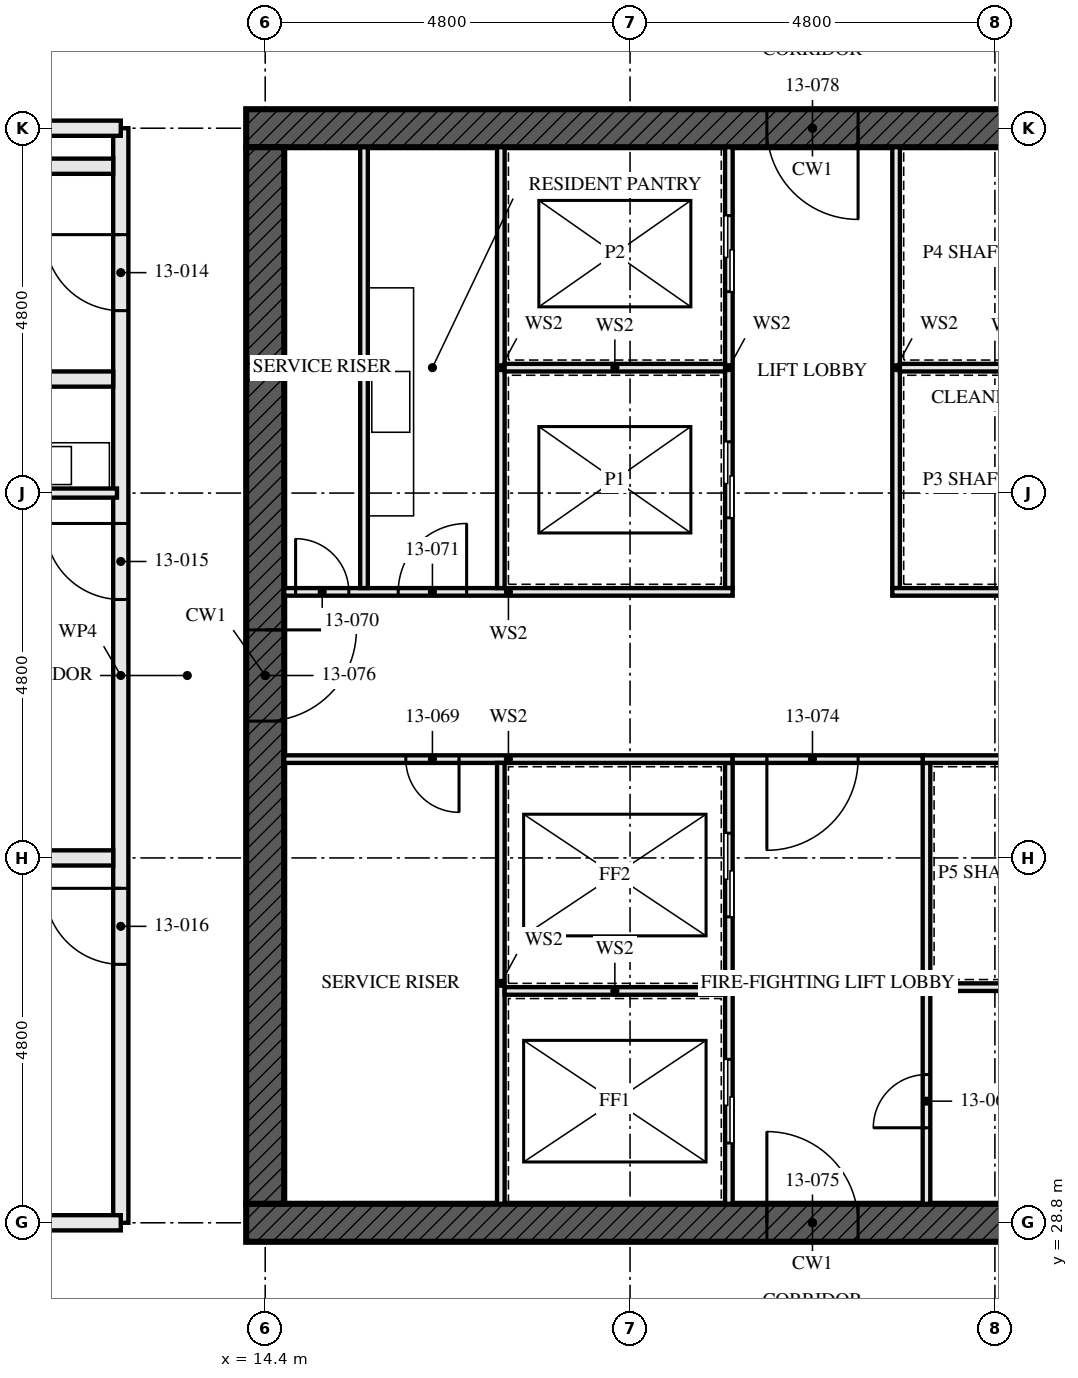
"""IFC4 building model, lengths in metres.
Left out: names, types, materials, properties, quantities, classifications, styles, units other than length and angle.
Written with IfcOpenShell. Run it as: python <this file> out.ifc"""

import sys

from ifc_helpers import new_model, si_unit, direction, frame, frame_2d, origin, place, context, subcontext, project, spatial, rectangle, extrude, element, fill, save


model = new_model("IFC4")
c1 = context("Model", 3, precision=1e-05, world=origin(), true_north=direction((0.0, 1.0)))
c2 = subcontext(c1, "Body", "Model", "MODEL_VIEW")
j1 = project(units=[si_unit("LENGTHUNIT", "METRE"), si_unit("PLANEANGLEUNIT", "RADIAN")], contexts=[c1])
p1 = place(None, origin())
s1 = spatial("IfcSite", under=j1, at=p1, CompositionType="ELEMENT")
p2 = place(p1, origin())
s2 = spatial("IfcBuilding", under=s1, at=p2, CompositionType="ELEMENT")
p3 = place(p2, frame((0.0, 0.0, 51.5)))
s3 = spatial("IfcBuildingStorey", under=s2, at=p3, CompositionType="ELEMENT", Elevation=51.5)
p4 = place(p3, frame((14.15, 28.8, -0.17), z_axis=(0.0, 0.0, 1.0), x_axis=(1.0, 0.0, 0.0)))
e1 = element("IfcWall", 1, at=p4, inside=s3, PredefinedType="SHEAR", context=c2, shape_type="SweptSolid", body=[
    extrude(rectangle(XDim=14.9, YDim=0.5, at=frame_2d((7.45, 0.0))), origin(), (0.0, 0.0, 1.0), 3.5),
])
p5 = place(p4, frame((6.85, 0.0, 0.17)))
e2 = element("IfcOpeningElement", 2, at=p5, cuts=e1, PredefinedType="OPENING", context=c2, shape_type="SweptSolid", body=[
    extrude(rectangle(XDim=1.2, YDim=2.1, at=frame_2d((0.6, 1.05))), frame((0.0, 0.26, 0.0), z_axis=(0.0, -1.0, 0.0), x_axis=(1.0, 0.0, 0.0)), (0.0, 0.0, 1.0), 0.521),
])
p6 = place(p3, frame((29.05, 43.2, -0.17), z_axis=(0.0, 0.0, 1.0), x_axis=(-1.0, 0.0, 0.0)))
e3 = element("IfcWall", 3, at=p6, inside=s3, PredefinedType="SHEAR", context=c2, shape_type="SweptSolid", body=[
    extrude(rectangle(XDim=14.9, YDim=0.5, at=frame_2d((7.45, 0.0))), origin(), (0.0, 0.0, 1.0), 3.5),
])
p7 = place(p6, frame((6.85, 0.0, 0.17)))
e4 = element("IfcOpeningElement", 4, at=p7, cuts=e3, PredefinedType="OPENING", context=c2, shape_type="SweptSolid", body=[
    extrude(rectangle(XDim=1.2, YDim=2.1, at=frame_2d((0.6, 1.05))), frame((0.0, 0.26, 0.0), z_axis=(0.0, -1.0, 0.0), x_axis=(1.0, 0.0, 0.0)), (0.0, 0.0, 1.0), 0.521),
])
p8 = place(p3, frame((14.4, 42.95, -0.17), z_axis=(0.0, 0.0, 1.0), x_axis=(0.0, -1.0, 0.0)))
e5 = element("IfcWall", 5, at=p8, inside=s3, PredefinedType="SHEAR", context=c2, shape_type="SweptSolid", body=[
    extrude(rectangle(XDim=13.9, YDim=0.5, at=frame_2d((6.95, 0.0))), origin(), (0.0, 0.0, 1.0), 3.5),
])
p9 = place(p8, frame((6.35, 0.0, 0.17)))
e6 = element("IfcOpeningElement", 6, at=p9, cuts=e5, PredefinedType="OPENING", context=c2, shape_type="SweptSolid", body=[
    extrude(rectangle(XDim=1.2, YDim=2.1, at=frame_2d((0.6, 1.05))), frame((0.0, 0.26, 0.0), z_axis=(0.0, -1.0, 0.0), x_axis=(1.0, 0.0, 0.0)), (0.0, 0.0, 1.0), 0.521),
])
for number, where, z_axis, x_axis in (
    (7, (7.7, 42.7, 0.0), (0.0, 0.0, 1.0), (1.0, 0.0, 0.0)),
    (8, (7.7, 39.9, 0.0), (0.0, 0.0, 1.0), (1.0, 0.0, 0.0)),
):
    element("IfcWall", number, at=place(p3, frame(where, z_axis=z_axis, x_axis=x_axis)), inside=s3, PredefinedType="SOLIDWALL", context=c2, shape_type="SweptSolid", body=[
        extrude(rectangle(XDim=4.7, YDim=0.2, at=frame_2d((2.35, 0.0))), origin(), (0.0, 0.0, 1.0), 2.99),
    ])
p10 = place(p3, frame((6.2, 38.4, 0.0), z_axis=(0.0, 0.0, 1.0), x_axis=(1.0, 0.0, 0.0)))
e9 = element("IfcWall", 9, at=p10, inside=s3, PredefinedType="PARTITIONING", context=c2, shape_type="SweptSolid", body=[
    extrude(rectangle(XDim=6.25, YDim=0.12, at=frame_2d((3.125, 0.0))), origin(), (0.0, 0.0, 1.0), 2.55),
])
p11 = place(p10, frame((3.15, 0.0, 0.0)))
e10 = element("IfcOpeningElement", 10, at=p11, cuts=e9, PredefinedType="OPENING", context=c2, shape_type="SweptSolid", body=[
    extrude(rectangle(XDim=0.9, YDim=2.1, at=frame_2d((0.45, 1.05))), frame((0.0, 0.071, 0.0), z_axis=(0.0, -1.0, 0.0), x_axis=(1.0, 0.0, 0.0)), (0.0, 0.0, 1.0), 0.141),
])
p12 = place(p3, frame((0.395, 33.6, 0.0), z_axis=(0.0, 0.0, 1.0), x_axis=(1.0, 0.0, 0.0)))
e11 = element("IfcWall", 11, at=p12, inside=s3, PredefinedType="PARTITIONING", context=c2, shape_type="SweptSolid", body=[
    extrude(rectangle(XDim=12.005, YDim=0.2, at=frame_2d((6.002, 0.0))), origin(), (0.0, 0.0, 1.0), 2.55),
])
p13 = place(p3, frame((12.5, 43.2, 0.0), z_axis=(0.0, 0.0, 1.0), x_axis=(0.0, -1.0, 0.0)))
e12 = element("IfcWall", 12, at=p13, inside=s3, PredefinedType="PARTITIONING", context=c2, shape_type="SweptSolid", body=[
    extrude(rectangle(XDim=14.4, YDim=0.2, at=frame_2d((7.2, 0.0))), origin(), (0.0, 0.0, 1.0), 2.55),
])
p14 = place(p13, frame((1.4, 0.0, 0.0)))
e13 = element("IfcOpeningElement", 13, at=p14, cuts=e12, PredefinedType="OPENING", context=c2, shape_type="SweptSolid", body=[
    extrude(rectangle(XDim=1.0, YDim=2.1, at=frame_2d((0.5, 1.05))), frame((0.0, 0.111, 0.0), z_axis=(0.0, -1.0, 0.0), x_axis=(1.0, 0.0, 0.0)), (0.0, 0.0, 1.0), 0.221),
])
p15 = place(p13, frame((5.2, 0.0, 0.0)))
e14 = element("IfcOpeningElement", 14, at=p15, cuts=e12, PredefinedType="OPENING", context=c2, shape_type="SweptSolid", body=[
    extrude(rectangle(XDim=1.0, YDim=2.1, at=frame_2d((0.5, 1.05))), frame((0.0, 0.111, 0.0), z_axis=(0.0, -1.0, 0.0), x_axis=(1.0, 0.0, 0.0)), (0.0, 0.0, 1.0), 0.221),
])
p16 = place(p13, frame((10.0, 0.0, 0.0)))
e15 = element("IfcOpeningElement", 15, at=p16, cuts=e12, PredefinedType="OPENING", context=c2, shape_type="SweptSolid", body=[
    extrude(rectangle(XDim=1.0, YDim=2.1, at=frame_2d((0.5, 1.05))), frame((0.0, 0.111, 0.0), z_axis=(0.0, -1.0, 0.0), x_axis=(1.0, 0.0, 0.0)), (0.0, 0.0, 1.0), 0.221),
])
p17 = place(p3, frame((15.7, 37.15, 0.0), z_axis=(0.0, 0.0, 1.0), x_axis=(0.0, 1.0, 0.0)))
e16 = element("IfcWall", 16, at=p17, inside=s3, PredefinedType="SOLIDWALL", context=c2, shape_type="SweptSolid", body=[
    extrude(rectangle(XDim=5.8, YDim=0.1, at=frame_2d((2.9, 0.0))), origin(), (0.0, 0.0, 1.0), 3.33),
])
p18 = place(p3, frame((20.5, 29.05, 0.0), z_axis=(0.0, 0.0, 1.0), x_axis=(0.0, 1.0, 0.0)))
e17 = element("IfcWall", 17, at=p18, inside=s3, PredefinedType="SOLIDWALL", context=c2, shape_type="SweptSolid", body=[
    extrude(rectangle(XDim=5.8, YDim=0.1, at=frame_2d((2.9, 0.0))), origin(), (0.0, 0.0, 1.0), 3.33),
])
p19 = place(p18, frame((0.8, 0.0, 0.0)))
e18 = element("IfcOpeningElement", 18, at=p19, cuts=e17, PredefinedType="OPENING", context=c2, shape_type="SweptSolid", body=[
    extrude(rectangle(XDim=1.1, YDim=2.3, at=frame_2d((0.55, 1.15))), frame((0.0, 0.061, 0.0), z_axis=(0.0, -1.0, 0.0), x_axis=(1.0, 0.0, 0.0)), (0.0, 0.0, 1.0), 0.121),
])
p20 = place(p18, frame((3.775, 0.0, 0.0)))
e19 = element("IfcOpeningElement", 19, at=p20, cuts=e17, PredefinedType="OPENING", context=c2, shape_type="SweptSolid", body=[
    extrude(rectangle(XDim=1.1, YDim=2.3, at=frame_2d((0.55, 1.15))), frame((0.0, 0.061, 0.0), z_axis=(0.0, -1.0, 0.0), x_axis=(1.0, 0.0, 0.0)), (0.0, 0.0, 1.0), 0.121),
])
p21 = place(p3, frame((20.5, 37.15, 0.0), z_axis=(0.0, 0.0, 1.0), x_axis=(0.0, 1.0, 0.0)))
e20 = element("IfcWall", 20, at=p21, inside=s3, PredefinedType="SOLIDWALL", context=c2, shape_type="SweptSolid", body=[
    extrude(rectangle(XDim=5.8, YDim=0.1, at=frame_2d((2.9, 0.0))), origin(), (0.0, 0.0, 1.0), 3.33),
])
p22 = place(p21, frame((0.925, 0.0, 0.0)))
e21 = element("IfcOpeningElement", 21, at=p22, cuts=e20, PredefinedType="OPENING", context=c2, shape_type="SweptSolid", body=[
    extrude(rectangle(XDim=1.0, YDim=2.1, at=frame_2d((0.5, 1.05))), frame((0.0, 0.061, 0.0), z_axis=(0.0, -1.0, 0.0), x_axis=(1.0, 0.0, 0.0)), (0.0, 0.0, 1.0), 0.121),
])
p23 = place(p21, frame((3.9, 0.0, 0.0)))
e22 = element("IfcOpeningElement", 22, at=p23, cuts=e20, PredefinedType="OPENING", context=c2, shape_type="SweptSolid", body=[
    extrude(rectangle(XDim=1.0, YDim=2.1, at=frame_2d((0.5, 1.05))), frame((0.0, 0.061, 0.0), z_axis=(0.0, -1.0, 0.0), x_axis=(1.0, 0.0, 0.0)), (0.0, 0.0, 1.0), 0.121),
])
p24 = place(p3, frame((22.7, 37.15, 0.0), z_axis=(0.0, 0.0, 1.0), x_axis=(0.0, 1.0, 0.0)))
e23 = element("IfcWall", 23, at=p24, inside=s3, PredefinedType="SOLIDWALL", context=c2, shape_type="SweptSolid", body=[
    extrude(rectangle(XDim=5.8, YDim=0.1, at=frame_2d((2.9, 0.0))), origin(), (0.0, 0.0, 1.0), 3.33),
])
p25 = place(p3, frame((23.1, 29.05, 0.0), z_axis=(0.0, 0.0, 1.0), x_axis=(0.0, 1.0, 0.0)))
e24 = element("IfcWall", 24, at=p25, inside=s3, PredefinedType="SOLIDWALL", context=c2, shape_type="SweptSolid", body=[
    extrude(rectangle(XDim=5.8, YDim=0.1, at=frame_2d((2.9, 0.0))), origin(), (0.0, 0.0, 1.0), 3.33),
])
p26 = place(p25, frame((1.0, 0.0, 0.0)))
e25 = element("IfcOpeningElement", 25, at=p26, cuts=e24, PredefinedType="OPENING", context=c2, shape_type="SweptSolid", body=[
    extrude(rectangle(XDim=0.7, YDim=2.1, at=frame_2d((0.35, 1.05))), frame((0.0, 0.061, 0.0), z_axis=(0.0, -1.0, 0.0), x_axis=(1.0, 0.0, 0.0)), (0.0, 0.0, 1.0), 0.121),
])
p27 = place(p3, frame((14.65, 34.9, 0.0), z_axis=(0.0, 0.0, 1.0), x_axis=(1.0, 0.0, 0.0)))
e26 = element("IfcWall", 26, at=p27, inside=s3, PredefinedType="SOLIDWALL", context=c2, shape_type="SweptSolid", body=[
    extrude(rectangle(XDim=5.9, YDim=0.1, at=frame_2d((2.95, 0.0))), origin(), (0.0, 0.0, 1.0), 3.33),
])
p28 = place(p27, frame((1.6, 0.0, 0.0)))
e27 = element("IfcOpeningElement", 27, at=p28, cuts=e26, PredefinedType="OPENING", context=c2, shape_type="SweptSolid", body=[
    extrude(rectangle(XDim=0.7, YDim=2.1, at=frame_2d((0.35, 1.05))), frame((0.0, 0.061, 0.0), z_axis=(0.0, -1.0, 0.0), x_axis=(1.0, 0.0, 0.0)), (0.0, 0.0, 1.0), 0.121),
])
p29 = place(p3, frame((23.05, 34.9, 0.0), z_axis=(0.0, 0.0, 1.0), x_axis=(1.0, 0.0, 0.0)))
e28 = element("IfcWall", 28, at=p29, inside=s3, PredefinedType="SOLIDWALL", context=c2, shape_type="SweptSolid", body=[
    extrude(rectangle(XDim=5.5, YDim=0.1, at=frame_2d((2.75, 0.0))), origin(), (0.0, 0.0, 1.0), 3.33),
])
p30 = place(p3, frame((14.65, 37.1, 0.0), z_axis=(0.0, 0.0, 1.0), x_axis=(1.0, 0.0, 0.0)))
e29 = element("IfcWall", 29, at=p30, inside=s3, PredefinedType="SOLIDWALL", context=c2, shape_type="SweptSolid", body=[
    extrude(rectangle(XDim=5.9, YDim=0.1, at=frame_2d((2.95, 0.0))), origin(), (0.0, 0.0, 1.0), 3.33),
])
p31 = place(p30, frame((0.15, 0.0, 0.0)))
e30 = element("IfcOpeningElement", 30, at=p31, cuts=e29, PredefinedType="OPENING", context=c2, shape_type="SweptSolid", body=[
    extrude(rectangle(XDim=0.7, YDim=2.1, at=frame_2d((0.35, 1.05))), frame((0.0, 0.061, 0.0), z_axis=(0.0, -1.0, 0.0), x_axis=(1.0, 0.0, 0.0)), (0.0, 0.0, 1.0), 0.121),
])
p32 = place(p30, frame((1.5, 0.0, 0.0)))
e31 = element("IfcOpeningElement", 31, at=p32, cuts=e29, PredefinedType="OPENING", context=c2, shape_type="SweptSolid", body=[
    extrude(rectangle(XDim=0.9, YDim=2.1, at=frame_2d((0.45, 1.05))), frame((0.0, 0.061, 0.0), z_axis=(0.0, -1.0, 0.0), x_axis=(1.0, 0.0, 0.0)), (0.0, 0.0, 1.0), 0.121),
])
p33 = place(p3, frame((22.65, 37.1, 0.0), z_axis=(0.0, 0.0, 1.0), x_axis=(1.0, 0.0, 0.0)))
e32 = element("IfcWall", 32, at=p33, inside=s3, PredefinedType="SOLIDWALL", context=c2, shape_type="SweptSolid", body=[
    extrude(rectangle(XDim=5.9, YDim=0.1, at=frame_2d((2.95, 0.0))), origin(), (0.0, 0.0, 1.0), 3.33),
])
p34 = place(p33, frame((3.15, 0.0, 0.0)))
e33 = element("IfcOpeningElement", 33, at=p34, cuts=e32, PredefinedType="OPENING", context=c2, shape_type="SweptSolid", body=[
    extrude(rectangle(XDim=0.9, YDim=2.1, at=frame_2d((0.45, 1.05))), frame((0.0, 0.061, 0.0), z_axis=(0.0, -1.0, 0.0), x_axis=(1.0, 0.0, 0.0)), (0.0, 0.0, 1.0), 0.121),
])
p35 = place(p33, frame((4.7, 0.0, 0.0)))
e34 = element("IfcOpeningElement", 34, at=p35, cuts=e32, PredefinedType="OPENING", context=c2, shape_type="SweptSolid", body=[
    extrude(rectangle(XDim=0.7, YDim=2.1, at=frame_2d((0.35, 1.05))), frame((0.0, 0.061, 0.0), z_axis=(0.0, -1.0, 0.0), x_axis=(1.0, 0.0, 0.0)), (0.0, 0.0, 1.0), 0.121),
])
p36 = place(p3, frame((20.55, 34.9, 0.0), z_axis=(0.0, 0.0, 1.0), x_axis=(1.0, 0.0, 0.0)))
e35 = element("IfcWall", 35, at=p36, inside=s3, PredefinedType="SOLIDWALL", context=c2, shape_type="SweptSolid", body=[
    extrude(rectangle(XDim=2.5, YDim=0.1, at=frame_2d((1.25, 0.0))), origin(), (0.0, 0.0, 1.0), 3.33),
])
p37 = place(p36, frame((0.45, 0.0, 0.0)))
e36 = element("IfcOpeningElement", 36, at=p37, cuts=e35, PredefinedType="OPENING", context=c2, shape_type="SweptSolid", body=[
    extrude(rectangle(XDim=1.2, YDim=2.1, at=frame_2d((0.6, 1.05))), frame((0.0, 0.061, 0.0), z_axis=(0.0, -1.0, 0.0), x_axis=(1.0, 0.0, 0.0)), (0.0, 0.0, 1.0), 0.121),
])
p38 = place(p3, frame((17.5, 29.05, 0.0), z_axis=(0.0, 0.0, 1.0), x_axis=(0.0, 1.0, 0.0)))
e37 = element("IfcWall", 37, at=p38, inside=s3, PredefinedType="SOLIDWALL", context=c2, shape_type="SweptSolid", body=[
    extrude(rectangle(XDim=5.8, YDim=0.1, at=frame_2d((2.9, 0.0))), origin(), (0.0, 0.0, 1.0), 3.33),
])
p39 = place(p3, frame((17.55, 31.85, 0.0), z_axis=(0.0, 0.0, 1.0), x_axis=(1.0, 0.0, 0.0)))
e38 = element("IfcWall", 38, at=p39, inside=s3, PredefinedType="SOLIDWALL", context=c2, shape_type="SweptSolid", body=[
    extrude(rectangle(XDim=2.9, YDim=0.1, at=frame_2d((1.45, 0.0))), origin(), (0.0, 0.0, 1.0), 3.33),
])
p40 = place(p3, frame((17.5, 37.15, 0.0), z_axis=(0.0, 0.0, 1.0), x_axis=(0.0, 1.0, 0.0)))
e39 = element("IfcWall", 39, at=p40, inside=s3, PredefinedType="SOLIDWALL", context=c2, shape_type="SweptSolid", body=[
    extrude(rectangle(XDim=5.8, YDim=0.1, at=frame_2d((2.9, 0.0))), origin(), (0.0, 0.0, 1.0), 3.33),
])
for number, where, z_axis, x_axis in (
    (40, (17.55, 40.05, 0.0), (0.0, 0.0, 1.0), (1.0, 0.0, 0.0)),
    (41, (22.75, 40.05, 0.0), (0.0, 0.0, 1.0), (1.0, 0.0, 0.0)),
):
    element("IfcWall", number, at=place(p3, frame(where, z_axis=z_axis, x_axis=x_axis)), inside=s3, PredefinedType="SOLIDWALL", context=c2, shape_type="SweptSolid", body=[
        extrude(rectangle(XDim=2.9, YDim=0.1, at=frame_2d((1.45, 0.0))), origin(), (0.0, 0.0, 1.0), 3.33),
    ])
p41 = place(p3, frame((23.15, 31.9, 0.0), z_axis=(0.0, 0.0, 1.0), x_axis=(1.0, 0.0, 0.0)))
e42 = element("IfcWall", 42, at=p41, inside=s3, PredefinedType="SOLIDWALL", context=c2, shape_type="SweptSolid", body=[
    extrude(rectangle(XDim=5.4, YDim=0.1, at=frame_2d((2.7, 0.0))), origin(), (0.0, 0.0, 1.0), 3.33),
])
for number, where, z_axis, x_axis in (
    (43, (12.5, 28.8, 0.0), (0.0, 0.0, 1.0), (-1.0, 0.0, 0.0)),
    (44, (12.5, 43.2, 0.0), (0.0, 0.0, 1.0), (-1.0, 0.0, 0.0)),
):
    element("IfcWall", number, at=place(p3, frame(where, z_axis=z_axis, x_axis=x_axis)), inside=s3, PredefinedType="PARTITIONING", context=c2, shape_type="SweptSolid", body=[
        extrude(rectangle(XDim=2.505, YDim=0.2, at=frame_2d((1.252, 0.0))), origin(), (0.0, 0.0, 1.0), 2.32),
    ])
p42 = place(p14, frame((1.0, 0.0, 0.0), z_axis=(0.0, 0.0, 1.0), x_axis=(-1.0, 0.0, 0.0)))
e45 = element("IfcDoor", 45, at=p42, inside=s3, OperationType="SINGLE_SWING_LEFT", PredefinedType="DOOR", context=c2, shape_type="SweptSolid", body=[
    extrude(rectangle(XDim=1.0, YDim=2.1, at=frame_2d((0.5, 1.05))), frame((0.0, 0.032, 0.0), z_axis=(0.0, -1.0, 0.0), x_axis=(1.0, 0.0, 0.0)), (0.0, 0.0, 1.0), 0.064),
])
fill(e13, e45)
p43 = place(p15, frame((1.0, 0.0, 0.0), z_axis=(0.0, 0.0, 1.0), x_axis=(-1.0, 0.0, 0.0)))
e46 = element("IfcDoor", 46, at=p43, inside=s3, OperationType="SINGLE_SWING_LEFT", PredefinedType="DOOR", context=c2, shape_type="SweptSolid", body=[
    extrude(rectangle(XDim=1.0, YDim=2.1, at=frame_2d((0.5, 1.05))), frame((0.0, 0.027, 0.0), z_axis=(0.0, -1.0, 0.0), x_axis=(1.0, 0.0, 0.0)), (0.0, 0.0, 1.0), 0.054),
])
fill(e14, e46)
p44 = place(p16, frame((1.0, 0.0, 0.0), z_axis=(0.0, 0.0, 1.0), x_axis=(-1.0, 0.0, 0.0)))
e47 = element("IfcDoor", 47, at=p44, inside=s3, OperationType="SINGLE_SWING_LEFT", PredefinedType="DOOR", context=c2, shape_type="SweptSolid", body=[
    extrude(rectangle(XDim=1.0, YDim=2.1, at=frame_2d((0.5, 1.05))), frame((0.0, 0.027, 0.0), z_axis=(0.0, -1.0, 0.0), x_axis=(1.0, 0.0, 0.0)), (0.0, 0.0, 1.0), 0.054),
])
fill(e15, e47)
p45 = place(p19, origin())
e48 = element("IfcDoor", 48, at=p45, inside=s3, OperationType="SLIDING_TO_LEFT", PredefinedType="DOOR", context=c2, shape_type="SweptSolid", body=[
    extrude(rectangle(XDim=1.1, YDim=2.3, at=frame_2d((0.55, 1.15))), frame((0.0, 0.05, 0.0), z_axis=(0.0, -1.0, 0.0), x_axis=(1.0, 0.0, 0.0)), (0.0, 0.0, 1.0), 0.1),
])
fill(e18, e48)
p46 = place(p20, origin())
e49 = element("IfcDoor", 49, at=p46, inside=s3, OperationType="SLIDING_TO_LEFT", PredefinedType="DOOR", context=c2, shape_type="SweptSolid", body=[
    extrude(rectangle(XDim=1.1, YDim=2.3, at=frame_2d((0.55, 1.15))), frame((0.0, 0.05, 0.0), z_axis=(0.0, -1.0, 0.0), x_axis=(1.0, 0.0, 0.0)), (0.0, 0.0, 1.0), 0.1),
])
fill(e19, e49)
p47 = place(p22, origin())
e50 = element("IfcDoor", 50, at=p47, inside=s3, OperationType="SLIDING_TO_LEFT", PredefinedType="DOOR", context=c2, shape_type="SweptSolid", body=[
    extrude(rectangle(XDim=1.0, YDim=2.1, at=frame_2d((0.5, 1.05))), frame((0.0, 0.05, 0.0), z_axis=(0.0, -1.0, 0.0), x_axis=(1.0, 0.0, 0.0)), (0.0, 0.0, 1.0), 0.1),
])
fill(e21, e50)
p48 = place(p23, origin())
e51 = element("IfcDoor", 51, at=p48, inside=s3, OperationType="SLIDING_TO_LEFT", PredefinedType="DOOR", context=c2, shape_type="SweptSolid", body=[
    extrude(rectangle(XDim=1.0, YDim=2.1, at=frame_2d((0.5, 1.05))), frame((0.0, 0.05, 0.0), z_axis=(0.0, -1.0, 0.0), x_axis=(1.0, 0.0, 0.0)), (0.0, 0.0, 1.0), 0.1),
])
fill(e22, e51)
p49 = place(p26, origin())
e52 = element("IfcDoor", 52, at=p49, inside=s3, OperationType="SINGLE_SWING_RIGHT", PredefinedType="DOOR", context=c2, shape_type="SweptSolid", body=[
    extrude(rectangle(XDim=0.7, YDim=2.1, at=frame_2d((0.35, 1.05))), frame((0.0, 0.027, 0.0), z_axis=(0.0, -1.0, 0.0), x_axis=(1.0, 0.0, 0.0)), (0.0, 0.0, 1.0), 0.054),
])
fill(e25, e52)
p50 = place(p28, frame((0.7, 0.0, 0.0), z_axis=(0.0, 0.0, 1.0), x_axis=(-1.0, 0.0, 0.0)))
e53 = element("IfcDoor", 53, at=p50, inside=s3, OperationType="SINGLE_SWING_RIGHT", PredefinedType="DOOR", context=c2, shape_type="SweptSolid", body=[
    extrude(rectangle(XDim=0.7, YDim=2.1, at=frame_2d((0.35, 1.05))), frame((0.0, 0.027, 0.0), z_axis=(0.0, -1.0, 0.0), x_axis=(1.0, 0.0, 0.0)), (0.0, 0.0, 1.0), 0.054),
])
fill(e27, e53)
p51 = place(p31, origin())
e54 = element("IfcDoor", 54, at=p51, inside=s3, OperationType="SINGLE_SWING_RIGHT", PredefinedType="DOOR", context=c2, shape_type="SweptSolid", body=[
    extrude(rectangle(XDim=0.7, YDim=2.1, at=frame_2d((0.35, 1.05))), frame((0.0, 0.027, 0.0), z_axis=(0.0, -1.0, 0.0), x_axis=(1.0, 0.0, 0.0)), (0.0, 0.0, 1.0), 0.054),
])
fill(e30, e54)
p52 = place(p32, origin())
e55 = element("IfcDoor", 55, at=p52, inside=s3, OperationType="SINGLE_SWING_LEFT", PredefinedType="DOOR", context=c2, shape_type="SweptSolid", body=[
    extrude(rectangle(XDim=0.9, YDim=2.1, at=frame_2d((0.45, 1.05))), frame((0.0, 0.027, 0.0), z_axis=(0.0, -1.0, 0.0), x_axis=(1.0, 0.0, 0.0)), (0.0, 0.0, 1.0), 0.054),
])
fill(e31, e55)
p53 = place(p37, frame((1.2, 0.0, 0.0), z_axis=(0.0, 0.0, 1.0), x_axis=(-1.0, 0.0, 0.0)))
e56 = element("IfcDoor", 56, at=p53, inside=s3, OperationType="SINGLE_SWING_LEFT", PredefinedType="DOOR", context=c2, shape_type="SweptSolid", body=[
    extrude(rectangle(XDim=1.2, YDim=2.1, at=frame_2d((0.6, 1.05))), frame((0.0, 0.027, 0.0), z_axis=(0.0, -1.0, 0.0), x_axis=(1.0, 0.0, 0.0)), (0.0, 0.0, 1.0), 0.054),
])
fill(e36, e56)
p54 = place(p5, origin())
e57 = element("IfcDoor", 57, at=p54, inside=s3, OperationType="SINGLE_SWING_LEFT", PredefinedType="DOOR", context=c2, shape_type="SweptSolid", body=[
    extrude(rectangle(XDim=1.2, YDim=2.1, at=frame_2d((0.6, 1.05))), frame((0.0, 0.027, 0.0), z_axis=(0.0, -1.0, 0.0), x_axis=(1.0, 0.0, 0.0)), (0.0, 0.0, 1.0), 0.054),
])
fill(e2, e57)
p55 = place(p9, origin())
e58 = element("IfcDoor", 58, at=p55, inside=s3, OperationType="SINGLE_SWING_LEFT", PredefinedType="DOOR", context=c2, shape_type="SweptSolid", body=[
    extrude(rectangle(XDim=1.2, YDim=2.1, at=frame_2d((0.6, 1.05))), frame((0.0, 0.027, 0.0), z_axis=(0.0, -1.0, 0.0), x_axis=(1.0, 0.0, 0.0)), (0.0, 0.0, 1.0), 0.054),
])
fill(e6, e58)
p56 = place(p7, origin())
e59 = element("IfcDoor", 59, at=p56, inside=s3, OperationType="SINGLE_SWING_LEFT", PredefinedType="DOOR", context=c2, shape_type="SweptSolid", body=[
    extrude(rectangle(XDim=1.2, YDim=2.1, at=frame_2d((0.6, 1.05))), frame((0.0, 0.027, 0.0), z_axis=(0.0, -1.0, 0.0), x_axis=(1.0, 0.0, 0.0)), (0.0, 0.0, 1.0), 0.054),
])
fill(e4, e59)
save(model, sys.argv[1])
